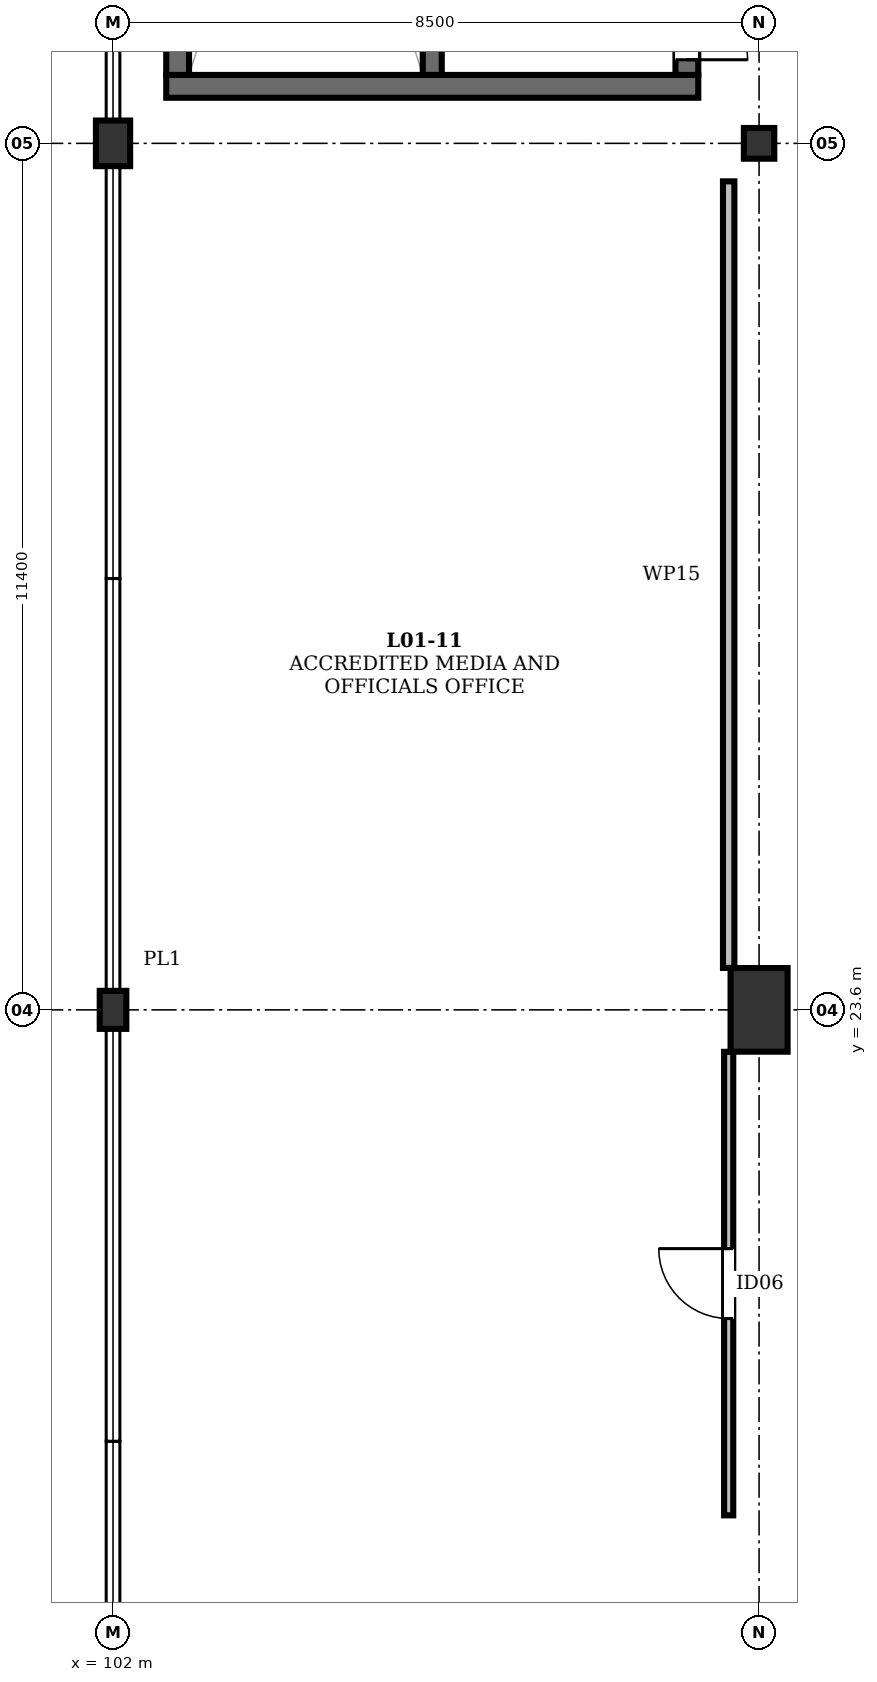
"""IFC4 building model, lengths in metres.
Left out: names, types, materials, properties, quantities, classifications, styles, units other than length and angle.
Written with IfcOpenShell. Run it as: python <this file> out.ifc"""

import sys

from ifc_helpers import new_model, si_unit, direction, frame, frame_2d, origin, origin_2d, place, context, subcontext, project, spatial, rectangle, i_section, extrude, element, fill, save


model = new_model("IFC4")
c1 = context("Model", 3, precision=1e-05, world=origin(), true_north=direction((0.0, 1.0)))
c2 = subcontext(c1, "Body", "Model", "MODEL_VIEW")
j1 = project(units=[si_unit("LENGTHUNIT", "METRE"), si_unit("PLANEANGLEUNIT", "RADIAN")], contexts=[c1])
p1 = place(None, origin())
s1 = spatial("IfcSite", under=j1, at=p1, CompositionType="ELEMENT")
p2 = place(p1, origin())
s2 = spatial("IfcBuilding", under=s1, at=p2, CompositionType="ELEMENT")
p3 = place(p2, frame((0.0, 0.0, 5.4)))
s3 = spatial("IfcBuildingStorey", under=s2, at=p3, CompositionType="ELEMENT", Elevation=5.4)
p4 = place(p3, frame((102.0, 23.6, 0.0), z_axis=(0.0, 0.0, 1.0), x_axis=(1.0, 0.0, 0.0)))
e1 = element("IfcColumn", 1, at=p4, inside=s3, PredefinedType="PILASTER", context=c2, shape_type="SweptSolid", body=[
    extrude(rectangle(XDim=0.35, YDim=0.5, at=origin_2d()), origin(), (0.0, 0.0, 1.0), 4.8),
])
p5 = place(p3, frame((102.0, 35.0, 0.0), z_axis=(0.0, 0.0, 1.0), x_axis=(1.0, 0.0, 0.0)))
e2 = element("IfcColumn", 2, at=p5, inside=s3, PredefinedType="PILASTER", context=c2, shape_type="SweptSolid", body=[
    extrude(rectangle(XDim=0.45, YDim=0.6, at=origin_2d()), origin(), (0.0, 0.0, 1.0), 4.8),
])
p6 = place(p3, frame((110.5, 23.6, 0.0), z_axis=(0.0, 0.0, 1.0), x_axis=(1.0, 0.0, 0.0)))
e3 = element("IfcColumn", 3, at=p6, inside=s3, PredefinedType="COLUMN", context=c2, shape_type="SweptSolid", body=[
    extrude(rectangle(XDim=0.75, YDim=1.1, at=origin_2d()), origin(), (0.0, 0.0, 1.0), 4.8),
])
p7 = place(p3, frame((110.5, 35.0, 0.0), z_axis=(0.0, 0.0, 1.0), x_axis=(1.0, 0.0, 0.0)))
e4 = element("IfcColumn", 4, at=p7, inside=s3, PredefinedType="COLUMN", context=c2, shape_type="SweptSolid", body=[
    extrude(i_section(OverallWidth=0.4, OverallDepth=0.404, WebThickness=0.02, FlangeThickness=0.032, at=origin_2d()), origin(), (0.0, 0.0, 1.0), 4.8),
])
p8 = place(p3, frame((102.7, 35.75, 0.0), z_axis=(0.0, 0.0, 1.0), x_axis=(1.0, 0.0, 0.0)))
e5 = element("IfcWall", 5, at=p8, inside=s3, PredefinedType="SHEAR", context=c2, shape_type="SweptSolid", body=[
    extrude(rectangle(XDim=7.0, YDim=0.3, at=frame_2d((3.5, 0.0))), origin(), (0.0, 0.0, 1.0), 4.56),
])
p9 = place(p3, frame((102.85, 35.9, 0.0), z_axis=(0.0, 0.0, 1.0), x_axis=(0.0, 1.0, 0.0)))
e6 = element("IfcWall", 6, at=p9, inside=s3, PredefinedType="SHEAR", context=c2, shape_type="SweptSolid", body=[
    extrude(rectangle(XDim=9.6, YDim=0.3, at=frame_2d((4.8, 0.0))), origin(), (0.0, 0.0, 1.0), 4.56),
])
p10 = place(p9, frame((3.6, 0.0, 0.0)))
e7 = element("IfcOpeningElement", 7, at=p10, cuts=e6, PredefinedType="OPENING", context=c2, shape_type="SweptSolid", body=[
    extrude(rectangle(XDim=1.1, YDim=2.2, at=frame_2d((0.55, 1.1))), frame((0.0, 0.162, 0.0), z_axis=(0.0, -1.0, 0.0), x_axis=(1.0, 0.0, 0.0)), (0.0, 0.0, 1.0), 0.324),
])
p11 = place(p3, frame((109.55, 35.9, 0.0), z_axis=(0.0, 0.0, 1.0), x_axis=(0.0, 1.0, 0.0)))
e8 = element("IfcWall", 8, at=p11, inside=s3, PredefinedType="SHEAR", context=c2, shape_type="SweptSolid", body=[
    extrude(rectangle(XDim=9.6, YDim=0.3, at=frame_2d((4.8, 0.0))), origin(), (0.0, 0.0, 1.0), 4.56),
])
p12 = place(p11, frame((0.2, 0.0, 0.0)))
e9 = element("IfcOpeningElement", 9, at=p12, cuts=e8, PredefinedType="OPENING", context=c2, shape_type="SweptSolid", body=[
    extrude(rectangle(XDim=1.6, YDim=2.2, at=frame_2d((0.8, 1.1))), frame((0.0, 0.162, 0.0), z_axis=(0.0, -1.0, 0.0), x_axis=(1.0, 0.0, 0.0)), (0.0, 0.0, 1.0), 0.324),
])
p13 = place(p3, frame((106.2, 35.9, 0.0), z_axis=(0.0, 0.0, 1.0), x_axis=(0.0, 1.0, 0.0)))
e10 = element("IfcWall", 10, at=p13, inside=s3, PredefinedType="SHEAR", context=c2, shape_type="SweptSolid", body=[
    extrude(rectangle(XDim=9.6, YDim=0.25, at=frame_2d((4.8, 0.0))), origin(), (0.0, 0.0, 1.0), 4.56),
])
p14 = place(p3, frame((110.1, 16.95, 0.0), z_axis=(0.0, 0.0, 1.0), x_axis=(0.0, 1.0, 0.0)))
e11 = element("IfcWall", 11, at=p14, inside=s3, PredefinedType="PARTITIONING", context=c2, shape_type="SweptSolid", body=[
    extrude(rectangle(XDim=6.098, YDim=0.12, at=frame_2d((3.049, 0.0))), origin(), (0.0, 0.0, 1.0), 3.845),
])
p15 = place(p14, frame((2.589, 0.0, 0.0)))
e12 = element("IfcOpeningElement", 12, at=p15, cuts=e11, PredefinedType="OPENING", context=c2, shape_type="SweptSolid", body=[
    extrude(rectangle(XDim=0.92, YDim=2.1, at=frame_2d((0.46, 1.05))), frame((0.0, 0.072, 0.0), z_axis=(0.0, -1.0, 0.0), x_axis=(1.0, 0.0, 0.0)), (0.0, 0.0, 1.0), 0.144),
])
p16 = place(p3, frame((110.1, 24.152, 0.0), z_axis=(0.0, 0.0, 1.0), x_axis=(0.0, 1.0, 0.0)))
e13 = element("IfcWall", 13, at=p16, inside=s3, PredefinedType="PARTITIONING", context=c2, shape_type="SweptSolid", body=[
    extrude(rectangle(XDim=10.348, YDim=0.15, at=frame_2d((5.174, 0.0))), origin(), (0.0, 0.0, 1.0), 3.845),
])
p17 = place(p12, frame((1.6, 0.0, 0.0), z_axis=(0.0, 0.0, 1.0), x_axis=(-1.0, 0.0, 0.0)))
e14 = element("IfcDoor", 14, at=p17, inside=s3, OperationType="DOUBLE_DOOR_SINGLE_SWING", PredefinedType="DOOR", context=c2, shape_type="SweptSolid", body=[
    extrude(rectangle(XDim=1.6, YDim=2.2, at=frame_2d((0.8, 1.1))), frame((0.0, 0.025, 0.0), z_axis=(0.0, -1.0, 0.0), x_axis=(1.0, 0.0, 0.0)), (0.0, 0.0, 1.0), 0.05),
])
fill(e9, e14)
p18 = place(p15, origin())
e15 = element("IfcDoor", 15, at=p18, inside=s3, OperationType="SINGLE_SWING_RIGHT", PredefinedType="DOOR", context=c2, shape_type="SweptSolid", body=[
    extrude(rectangle(XDim=0.92, YDim=2.1, at=frame_2d((0.46, 1.05))), frame((0.0, 0.025, 0.0), z_axis=(0.0, -1.0, 0.0), x_axis=(1.0, 0.0, 0.0)), (0.0, 0.0, 1.0), 0.05),
])
fill(e12, e15)
save(model, sys.argv[1])
